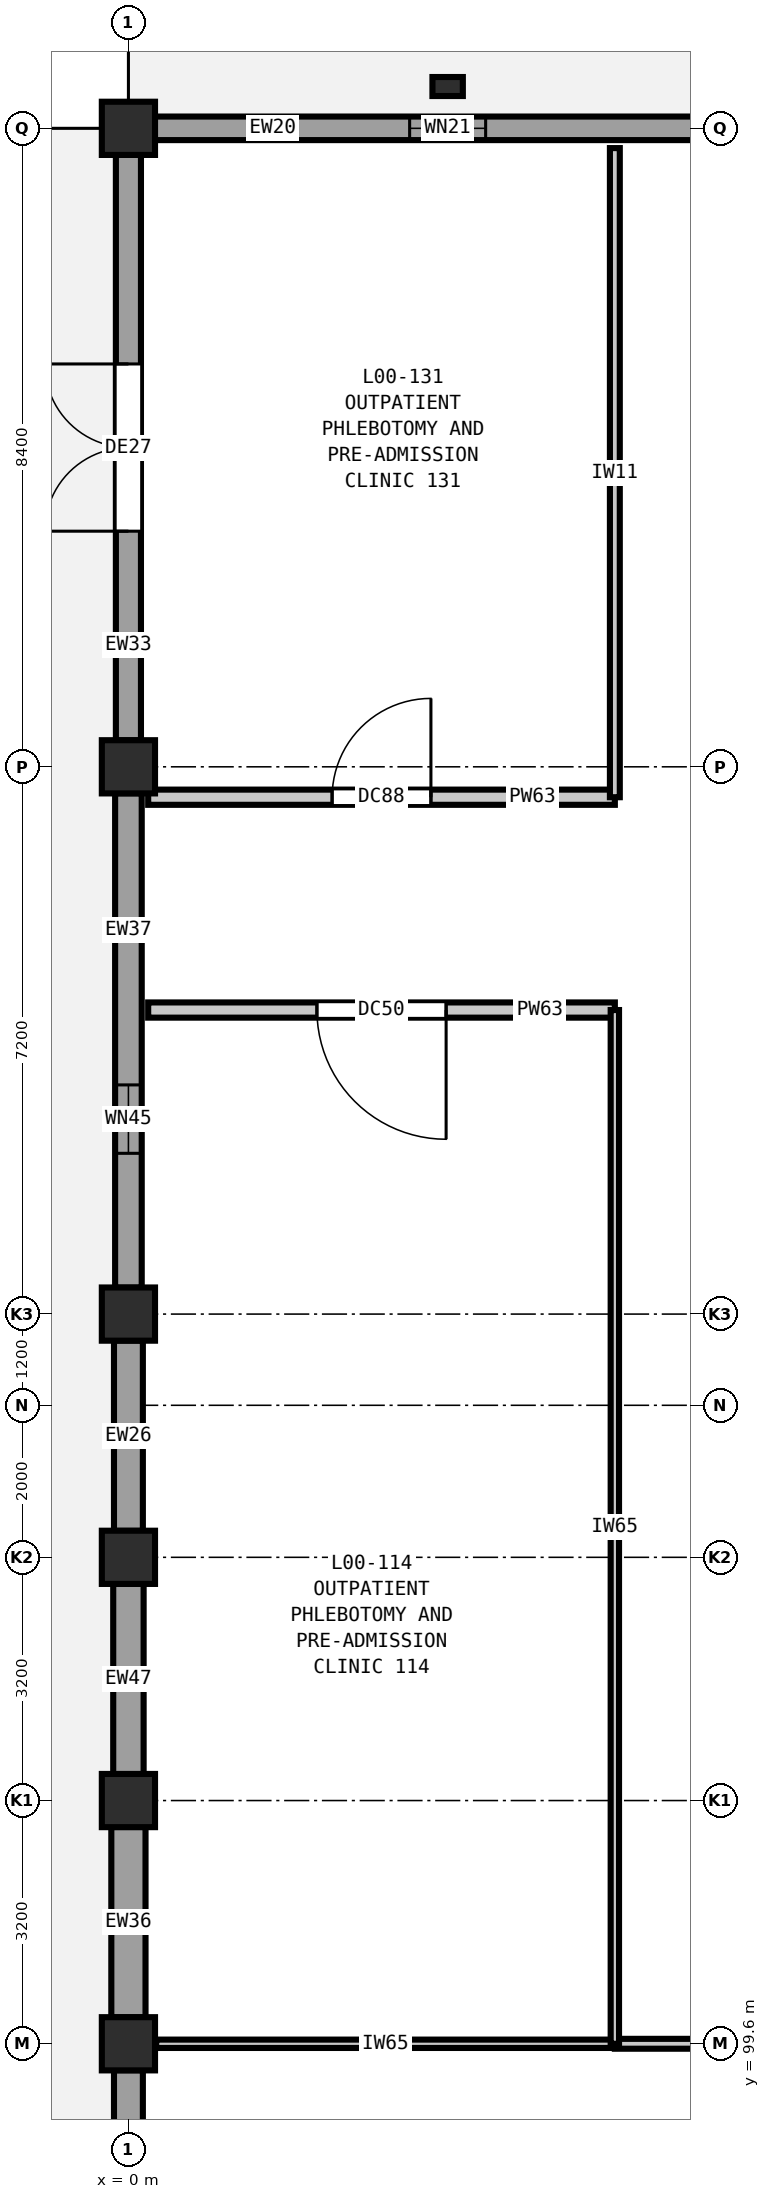
"""IFC4 building model, lengths in metres.
Left out: names, types, materials, properties, quantities, classifications, styles, units other than length and angle.
Written with IfcOpenShell. Run it as: python <this file> out.ifc"""

import sys

from ifc_helpers import new_model, si_unit, direction, frame, frame_2d, origin, origin_2d, place, context, subcontext, project, spatial, rectangle, extrude, element, fill, save


model = new_model("IFC4")
c1 = context("Model", 3, precision=1e-05, world=origin(), true_north=direction((0.0, 1.0)))
c2 = subcontext(c1, "Body", "Model", "MODEL_VIEW")
j1 = project(units=[si_unit("LENGTHUNIT", "METRE"), si_unit("PLANEANGLEUNIT", "RADIAN")], contexts=[c1])
p1 = place(None, origin())
s1 = spatial("IfcSite", under=j1, at=p1, CompositionType="ELEMENT")
p2 = place(p1, origin())
s2 = spatial("IfcBuilding", under=s1, at=p2, CompositionType="ELEMENT")
p3 = place(p2, origin())
s3 = spatial("IfcBuildingStorey", under=s2, at=p3, CompositionType="ELEMENT", Elevation=0.0)
for number, where, z_axis, x_axis in (
    (1, (0.0, 99.6, 0.0), (0.0, 0.0, 1.0), (1.0, 0.0, 0.0)),
    (2, (0.0, 102.8, 0.0), (0.0, 0.0, 1.0), (1.0, 0.0, 0.0)),
    (3, (0.0, 106.0, 0.0), (0.0, 0.0, 1.0), (1.0, 0.0, 0.0)),
    (4, (0.0, 109.2, 0.0), (0.0, 0.0, 1.0), (1.0, 0.0, 0.0)),
    (5, (0.0, 116.4, 0.0), (0.0, 0.0, 1.0), (1.0, 0.0, 0.0)),
    (6, (0.0, 124.8, 0.0), (0.0, 0.0, 1.0), (1.0, 0.0, 0.0)),
):
    element("IfcColumn", number, at=place(p3, frame(where, z_axis=z_axis, x_axis=x_axis)), inside=s3, PredefinedType="COLUMN", context=c2, shape_type="SweptSolid", body=[
        extrude(rectangle(XDim=0.7, YDim=0.7, at=origin_2d()), origin(), (0.0, 0.0, 1.0), 5.4),
    ])
p4 = place(p3, frame((4.2, 125.35, 0.0), z_axis=(0.0, 0.0, 1.0), x_axis=(1.0, 0.0, 0.0)))
e7 = element("IfcColumn", 7, at=p4, inside=s3, PredefinedType="PILASTER", context=c2, shape_type="SweptSolid", body=[
    extrude(rectangle(XDim=0.4, YDim=0.25, at=origin_2d()), origin(), (0.0, 0.0, 1.0), 5.4),
])
p5 = place(p3, frame((0.0, 91.548, 0.0), z_axis=(0.0, 0.0, 1.0), x_axis=(0.0, 1.0, 0.0)))
e8 = element("IfcWall", 8, at=p5, inside=s3, PredefinedType="SOLIDWALL", context=c2, shape_type="SweptSolid", body=[
    extrude(rectangle(XDim=7.704, YDim=0.38, at=frame_2d((3.852, 0.0))), origin(), (0.0, 0.0, 1.0), 4.68),
])
p6 = place(p5, frame((3.152, 0.0, 0.9)))
e9 = element("IfcOpeningElement", 9, at=p6, cuts=e8, PredefinedType="OPENING", context=c2, shape_type="SweptSolid", body=[
    extrude(rectangle(XDim=1.4, YDim=1.4, at=frame_2d((0.7, 0.7))), frame((0.0, 0.2, 0.0), z_axis=(0.0, -1.0, 0.0), x_axis=(1.0, 0.0, 0.0)), (0.0, 0.0, 1.0), 0.4),
])
p7 = place(p3, frame((0.0, 99.948, 0.0), z_axis=(0.0, 0.0, 1.0), x_axis=(0.0, 1.0, 0.0)))
e10 = element("IfcWall", 10, at=p7, inside=s3, PredefinedType="SOLIDWALL", context=c2, shape_type="SweptSolid", body=[
    extrude(rectangle(XDim=2.504, YDim=0.45, at=frame_2d((1.252, 0.0))), origin(), (0.0, 0.0, 1.0), 4.68),
])
p8 = place(p3, frame((0.0, 103.148, 0.0), z_axis=(0.0, 0.0, 1.0), x_axis=(0.0, 1.0, 0.0)))
e11 = element("IfcWall", 11, at=p8, inside=s3, PredefinedType="SOLIDWALL", context=c2, shape_type="SweptSolid", body=[
    extrude(rectangle(XDim=2.504, YDim=0.4, at=frame_2d((1.252, 0.0))), origin(), (0.0, 0.0, 1.0), 4.68),
])
p9 = place(p3, frame((0.0, 106.348, 0.0), z_axis=(0.0, 0.0, 1.0), x_axis=(0.0, 1.0, 0.0)))
e12 = element("IfcWall", 12, at=p9, inside=s3, PredefinedType="SOLIDWALL", context=c2, shape_type="SweptSolid", body=[
    extrude(rectangle(XDim=2.504, YDim=0.38, at=frame_2d((1.252, 0.0))), origin(), (0.0, 0.0, 1.0), 4.68),
])
p10 = place(p3, frame((0.0, 109.548, 0.0), z_axis=(0.0, 0.0, 1.0), x_axis=(0.0, 1.0, 0.0)))
e13 = element("IfcWall", 13, at=p10, inside=s3, PredefinedType="SOLIDWALL", context=c2, shape_type="SweptSolid", body=[
    extrude(rectangle(XDim=6.504, YDim=0.35, at=frame_2d((3.252, 0.0))), origin(), (0.0, 0.0, 1.0), 4.68),
])
p11 = place(p10, frame((1.767, 0.0, 0.9)))
e14 = element("IfcOpeningElement", 14, at=p11, cuts=e13, PredefinedType="OPENING", context=c2, shape_type="SweptSolid", body=[
    extrude(rectangle(XDim=0.9, YDim=1.55, at=frame_2d((0.45, 0.775))), frame((0.0, 0.185, 0.0), z_axis=(0.0, -1.0, 0.0), x_axis=(1.0, 0.0, 0.0)), (0.0, 0.0, 1.0), 0.37),
])
p12 = place(p3, frame((0.0, 116.748, 0.0), z_axis=(0.0, 0.0, 1.0), x_axis=(0.0, 1.0, 0.0)))
e15 = element("IfcWall", 15, at=p12, inside=s3, PredefinedType="SOLIDWALL", context=c2, shape_type="SweptSolid", body=[
    extrude(rectangle(XDim=7.704, YDim=0.33, at=frame_2d((3.852, 0.0))), origin(), (0.0, 0.0, 1.0), 4.68),
])
p13 = place(p12, frame((2.752, 0.0, 0.0)))
e16 = element("IfcOpeningElement", 16, at=p13, cuts=e15, PredefinedType="OPENING", context=c2, shape_type="SweptSolid", body=[
    extrude(rectangle(XDim=2.2, YDim=2.4, at=frame_2d((1.1, 1.2))), frame((0.0, 0.175, 0.0), z_axis=(0.0, -1.0, 0.0), x_axis=(1.0, 0.0, 0.0)), (0.0, 0.0, 1.0), 0.35),
])
p14 = place(p3, frame((0.348, 124.8, 0.0), z_axis=(0.0, 0.0, 1.0), x_axis=(1.0, 0.0, 0.0)))
e17 = element("IfcWall", 17, at=p14, inside=s3, PredefinedType="SOLIDWALL", context=c2, shape_type="SweptSolid", body=[
    extrude(rectangle(XDim=7.704, YDim=0.31, at=frame_2d((3.852, 0.0))), origin(), (0.0, 0.0, 1.0), 4.68),
])
p15 = place(p14, frame((3.352, 0.0, 0.9)))
e18 = element("IfcOpeningElement", 18, at=p15, cuts=e17, PredefinedType="OPENING", context=c2, shape_type="SweptSolid", body=[
    extrude(rectangle(XDim=1.0, YDim=1.55, at=frame_2d((0.5, 0.775))), frame((0.0, 0.165, 0.0), z_axis=(0.0, -1.0, 0.0), x_axis=(1.0, 0.0, 0.0)), (0.0, 0.0, 1.0), 0.33),
])
p16 = place(p3, frame((0.365, 99.6, 0.0), z_axis=(0.0, 0.0, 1.0), x_axis=(1.0, 0.0, 0.0)))
e19 = element("IfcWall", 19, at=p16, inside=s3, PredefinedType="PARTITIONING", context=c2, shape_type="SweptSolid", body=[
    extrude(rectangle(XDim=6.035, YDim=0.11, at=frame_2d((3.018, 0.0))), origin(), (0.0, 0.0, 1.0), 4.635),
])
p17 = place(p3, frame((6.4, 99.6, 0.0), z_axis=(0.0, 0.0, 1.0), x_axis=(1.0, 0.0, 0.0)))
e20 = element("IfcWall", 20, at=p17, inside=s3, PredefinedType="PARTITIONING", context=c2, shape_type="SweptSolid", body=[
    extrude(rectangle(XDim=1.635, YDim=0.13, at=frame_2d((0.817, 0.0))), origin(), (0.0, 0.0, 1.0), 4.635),
])
p18 = place(p3, frame((0.26, 113.2, 0.0), z_axis=(0.0, 0.0, 1.0), x_axis=(1.0, 0.0, 0.0)))
e21 = element("IfcWall", 21, at=p18, inside=s3, PredefinedType="PARTITIONING", context=c2, shape_type="SweptSolid", body=[
    extrude(rectangle(XDim=6.14, YDim=0.2, at=frame_2d((3.07, 0.0))), origin(), (0.0, 0.0, 1.0), 5.04),
])
p19 = place(p18, frame((2.22, 0.0, 0.0)))
e22 = element("IfcOpeningElement", 22, at=p19, cuts=e21, PredefinedType="OPENING", context=c2, shape_type="SweptSolid", body=[
    extrude(rectangle(XDim=1.7, YDim=2.3, at=frame_2d((0.85, 1.15))), frame((0.0, 0.11, 0.0), z_axis=(0.0, -1.0, 0.0), x_axis=(1.0, 0.0, 0.0)), (0.0, 0.0, 1.0), 0.22),
])
p20 = place(p3, frame((0.26, 116.0, 0.0), z_axis=(0.0, 0.0, 1.0), x_axis=(1.0, 0.0, 0.0)))
e23 = element("IfcWall", 23, at=p20, inside=s3, PredefinedType="PARTITIONING", context=c2, shape_type="SweptSolid", body=[
    extrude(rectangle(XDim=6.14, YDim=0.2, at=frame_2d((3.07, 0.0))), origin(), (0.0, 0.0, 1.0), 5.04),
])
p21 = place(p20, frame((2.42, 0.0, 0.0)))
e24 = element("IfcOpeningElement", 24, at=p21, cuts=e23, PredefinedType="OPENING", context=c2, shape_type="SweptSolid", body=[
    extrude(rectangle(XDim=1.3, YDim=2.2, at=frame_2d((0.65, 1.1))), frame((0.0, 0.11, 0.0), z_axis=(0.0, -1.0, 0.0), x_axis=(1.0, 0.0, 0.0)), (0.0, 0.0, 1.0), 0.22),
])
p22 = place(p3, frame((6.4, 99.6, 0.0), z_axis=(0.0, 0.0, 1.0), x_axis=(0.0, 1.0, 0.0)))
e25 = element("IfcWall", 25, at=p22, inside=s3, PredefinedType="PARTITIONING", context=c2, shape_type="SweptSolid", body=[
    extrude(rectangle(XDim=13.6, YDim=0.11, at=frame_2d((6.8, 0.0))), origin(), (0.0, 0.0, 1.0), 5.04),
])
p23 = place(p3, frame((6.4, 116.0, 0.0), z_axis=(0.0, 0.0, 1.0), x_axis=(0.0, 1.0, 0.0)))
e26 = element("IfcWall", 26, at=p23, inside=s3, PredefinedType="PARTITIONING", context=c2, shape_type="SweptSolid", body=[
    extrude(rectangle(XDim=8.54, YDim=0.13, at=frame_2d((4.27, 0.0))), origin(), (0.0, 0.0, 1.0), 5.04),
])
p24 = place(p11, origin())
e27 = element("IfcWindow", 27, at=p24, inside=s3, PartitioningType="SINGLE_PANEL", PredefinedType="WINDOW", context=c2, shape_type="SweptSolid", body=[
    extrude(rectangle(XDim=0.9, YDim=1.55, at=frame_2d((0.45, 0.775))), frame((0.0, 0.03, 0.0), z_axis=(0.0, -1.0, 0.0), x_axis=(1.0, 0.0, 0.0)), (0.0, 0.0, 1.0), 0.06),
])
fill(e14, e27)
p25 = place(p13, origin())
e28 = element("IfcDoor", 28, at=p25, inside=s3, OperationType="DOUBLE_DOOR_SINGLE_SWING", PredefinedType="DOOR", context=c2, shape_type="SweptSolid", body=[
    extrude(rectangle(XDim=2.2, YDim=2.4, at=frame_2d((1.1, 1.2))), frame((0.0, 0.025, 0.0), z_axis=(0.0, -1.0, 0.0), x_axis=(1.0, 0.0, 0.0)), (0.0, 0.0, 1.0), 0.05),
])
fill(e16, e28)
p26 = place(p15, origin())
e29 = element("IfcWindow", 29, at=p26, inside=s3, PartitioningType="SINGLE_PANEL", PredefinedType="WINDOW", context=c2, shape_type="SweptSolid", body=[
    extrude(rectangle(XDim=1.0, YDim=1.55, at=frame_2d((0.5, 0.775))), frame((0.0, 0.03, 0.0), z_axis=(0.0, -1.0, 0.0), x_axis=(1.0, 0.0, 0.0)), (0.0, 0.0, 1.0), 0.06),
])
fill(e18, e29)
p27 = place(p19, frame((1.7, 0.0, 0.0), z_axis=(0.0, 0.0, 1.0), x_axis=(-1.0, 0.0, 0.0)))
e30 = element("IfcDoor", 30, at=p27, inside=s3, OperationType="SINGLE_SWING_LEFT", PredefinedType="DOOR", context=c2, shape_type="SweptSolid", body=[
    extrude(rectangle(XDim=1.7, YDim=2.3, at=frame_2d((0.85, 1.15))), frame((0.0, 0.025, 0.0), z_axis=(0.0, -1.0, 0.0), x_axis=(1.0, 0.0, 0.0)), (0.0, 0.0, 1.0), 0.05),
])
fill(e22, e30)
p28 = place(p21, origin())
e31 = element("IfcDoor", 31, at=p28, inside=s3, OperationType="SINGLE_SWING_RIGHT", PredefinedType="DOOR", context=c2, shape_type="SweptSolid", body=[
    extrude(rectangle(XDim=1.3, YDim=2.2, at=frame_2d((0.65, 1.1))), frame((0.0, 0.025, 0.0), z_axis=(0.0, -1.0, 0.0), x_axis=(1.0, 0.0, 0.0)), (0.0, 0.0, 1.0), 0.05),
])
fill(e24, e31)
save(model, sys.argv[1])
